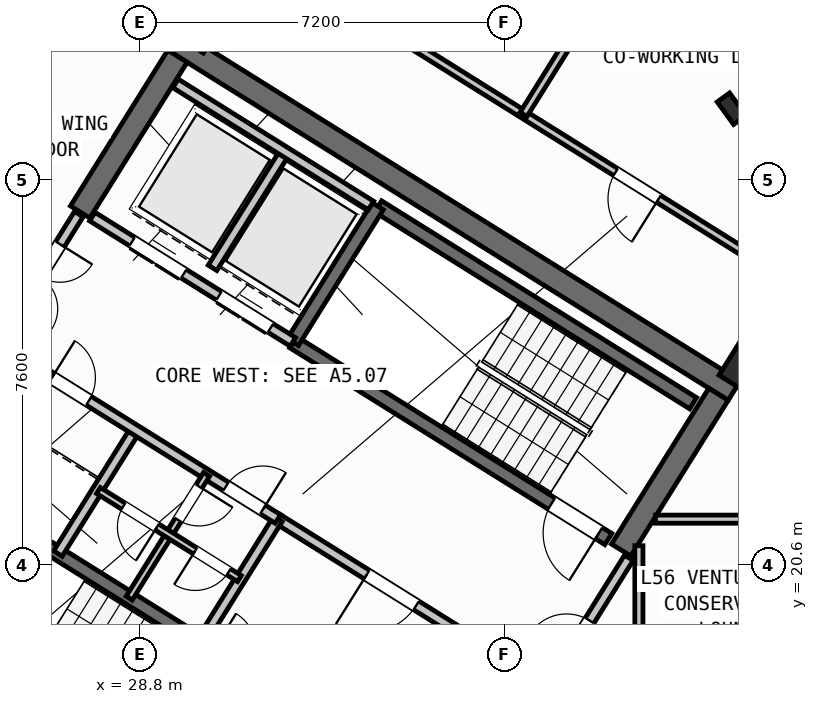
"""IFC4 building model, lengths in metres.
Left out: names, types, materials, properties, quantities, classifications, styles, units other than length and angle.
Written with IfcOpenShell. Run it as: python <this file> out.ifc"""

import sys

from ifc_helpers import new_model, si_unit, direction, frame, frame_2d, origin, origin_2d, place, context, subcontext, project, spatial, rectangle, hollow_rectangle, i_section, extrude, source, transform, mapped, element, fill, save


model = new_model("IFC4")
c1 = context("Model", 3, precision=1e-05, world=origin(), true_north=direction((0.0, 1.0)))
c2 = subcontext(c1, "Body", "Model", "MODEL_VIEW")
j1 = project(units=[si_unit("LENGTHUNIT", "METRE"), si_unit("PLANEANGLEUNIT", "RADIAN")], contexts=[c1])
p1 = place(None, origin())
s1 = spatial("IfcSite", under=j1, at=p1, CompositionType="ELEMENT")
p2 = place(p1, origin())
s2 = spatial("IfcBuilding", under=s1, at=p2, CompositionType="ELEMENT")
p3 = place(p2, frame((0.0, 0.0, 222.0)))
s3 = spatial("IfcBuildingStorey", under=s2, at=p3, CompositionType="ELEMENT", Elevation=222.0)
p4 = place(p3, frame((40.531, 24.036, 0.0), z_axis=(0.0, 0.0, 1.0), x_axis=(-0.848048787466, 0.529918157905, 0.0)))
e1 = element("IfcWall", 1, at=p4, inside=s3, PredefinedType="SHEAR", context=c2, shape_type="SweptSolid", body=[
    extrude(rectangle(XDim=13.04, YDim=0.45, at=frame_2d((6.52, 0.0))), origin(), (0.0, 0.0, 1.0), 3.35),
])
p5 = place(p3, frame((33.324, 12.503, 0.0), z_axis=(0.0, 0.0, 1.0), x_axis=(-0.848043529849, 0.529926571782, 0.0)))
e2 = element("IfcWall", 2, at=p5, inside=s3, PredefinedType="SHEAR", context=c2, shape_type="SweptSolid", body=[
    extrude(rectangle(XDim=13.04, YDim=0.45, at=frame_2d((6.52, 0.0))), origin(), (0.0, 0.0, 1.0), 3.35),
])
for number, where, z_axis, x_axis in (
    (3, (40.221, 23.965, 0.0), (0.0, 0.0, 1.0), (-0.53, -0.848, 0.0)),
    (4, (29.544, 30.636, 0.0), (0.0, 0.0, 1.0), (-0.53, -0.848, 0.0)),
):
    element("IfcWall", number, at=place(p3, frame(where, z_axis=z_axis, x_axis=x_axis)), inside=s3, PredefinedType="SHEAR", context=c2, shape_type="SweptSolid", body=[
        extrude(rectangle(XDim=3.625, YDim=0.45, at=frame_2d((1.812, 0.0))), origin(), (0.0, 0.0, 1.0), 3.35),
    ])
m1 = source(origin(), c2, "Body", "SweptSolid", [
    extrude(hollow_rectangle(XDim=0.8, YDim=0.8, WallThickness=0.032, at=origin_2d()), origin(), (0.0, 0.0, 1.0), 3.6),
])
for number, where, z_axis, x_axis in (
    (5, (40.783, 24.469, 0.0), (0.0, 0.0, 1.0), (-0.848, 0.53, 0.0)),
    (6, (29.928, 31.251, 0.0), (0.0, 0.0, 1.0), (-0.848, 0.53, 0.0)),
):
    element("IfcColumn", number, at=place(p3, frame(where, z_axis=z_axis, x_axis=x_axis)), inside=s3, PredefinedType="COLUMN", context=c2, shape_type="MappedRepresentation", body=[
        mapped(m1, transform((0.0, 0.0, 0.0), scale=1.0)),
    ])
m2 = source(origin(), c2, "Body", "SweptSolid", [
    extrude(i_section(OverallWidth=0.3, OverallDepth=0.55, WebThickness=0.015, FlangeThickness=0.029, at=origin_2d()), origin(), (0.0, 0.0, 1.0), 3.6),
])
p6 = place(p3, frame((40.479, 29.601, 0.0), z_axis=(0.0, 0.0, 1.0), x_axis=(0.809016994375, 0.587785252292, 0.0)))
e7 = element("IfcColumn", 7, at=p6, inside=s3, PredefinedType="COLUMN", context=c2, shape_type="MappedRepresentation", body=[
    mapped(m2, transform((0.0, 0.0, 0.0), scale=1.0)),
])
p7 = place(p3, frame((31.76, 12.183, 0.0), z_axis=(0.0, 0.0, 1.0), x_axis=(-0.848047074256, 0.529920899612, 0.0)))
e8 = element("IfcWall", 8, at=p7, inside=s3, PredefinedType="STANDARD", context=c2, shape_type="SweptSolid", body=[
    extrude(rectangle(XDim=30.652, YDim=0.32, at=frame_2d((15.326, 0.0))), origin(), (0.0, 0.0, 1.0), 3.35),
])
p8 = place(p7, frame((15.166, 0.0, 0.0)))
e9 = element("IfcOpeningElement", 9, at=p8, cuts=e8, PredefinedType="OPENING", context=c2, shape_type="SweptSolid", body=[
    extrude(rectangle(XDim=1.2, YDim=2.15, at=frame_2d((0.6, 1.075))), frame((0.0, 0.17, 0.0), z_axis=(0.0, -1.0, 0.0), x_axis=(1.0, 0.0, 0.0)), (0.0, 0.0, 1.0), 0.34),
])
p9 = place(p7, frame((2.24, 0.0, 0.9)))
e10 = element("IfcOpeningElement", 10, at=p9, cuts=e8, PredefinedType="OPENING", context=c2, shape_type="SweptSolid", body=[
    extrude(rectangle(XDim=1.65, YDim=1.45, at=frame_2d((0.825, 0.725))), frame((0.0, 0.17, 0.0), z_axis=(0.0, -1.0, 0.0), x_axis=(1.0, 0.0, 0.0)), (0.0, 0.0, 1.0), 0.34),
])
p10 = place(p7, frame((7.469, 0.0, 0.9)))
e11 = element("IfcOpeningElement", 11, at=p10, cuts=e8, PredefinedType="OPENING", context=c2, shape_type="SweptSolid", body=[
    extrude(rectangle(XDim=1.65, YDim=1.45, at=frame_2d((0.825, 0.725))), frame((0.0, 0.17, 0.0), z_axis=(0.0, -1.0, 0.0), x_axis=(1.0, 0.0, 0.0)), (0.0, 0.0, 1.0), 0.34),
])
p11 = place(p7, frame((12.623, 0.0, 1.0)))
e12 = element("IfcOpeningElement", 12, at=p11, cuts=e8, PredefinedType="OPENING", context=c2, shape_type="SweptSolid", body=[
    extrude(rectangle(XDim=0.9, YDim=1.25, at=frame_2d((0.45, 0.625))), frame((0.0, 0.17, 0.0), z_axis=(0.0, -1.0, 0.0), x_axis=(1.0, 0.0, 0.0)), (0.0, 0.0, 1.0), 0.34),
])
p12 = place(p7, frame((19.583, 0.0, 1.0)))
e13 = element("IfcOpeningElement", 13, at=p12, cuts=e8, PredefinedType="OPENING", context=c2, shape_type="SweptSolid", body=[
    extrude(rectangle(XDim=0.9, YDim=1.25, at=frame_2d((0.45, 0.625))), frame((0.0, 0.17, 0.0), z_axis=(0.0, -1.0, 0.0), x_axis=(1.0, 0.0, 0.0)), (0.0, 0.0, 1.0), 0.34),
])
p13 = place(p7, frame((22.033, 0.0, 1.0)))
e14 = element("IfcOpeningElement", 14, at=p13, cuts=e8, PredefinedType="OPENING", context=c2, shape_type="SweptSolid", body=[
    extrude(rectangle(XDim=0.9, YDim=1.25, at=frame_2d((0.45, 0.625))), frame((0.0, 0.17, 0.0), z_axis=(0.0, -1.0, 0.0), x_axis=(1.0, 0.0, 0.0)), (0.0, 0.0, 1.0), 0.34),
])
p14 = place(p7, frame((27.666, 0.0, 0.9)))
e15 = element("IfcOpeningElement", 15, at=p14, cuts=e8, PredefinedType="OPENING", context=c2, shape_type="SweptSolid", body=[
    extrude(rectangle(XDim=1.35, YDim=1.45, at=frame_2d((0.675, 0.725))), frame((0.0, 0.17, 0.0), z_axis=(0.0, -1.0, 0.0), x_axis=(1.0, 0.0, 0.0)), (0.0, 0.0, 1.0), 0.34),
])
p15 = place(p3, frame((29.605, 15.581, 0.0), z_axis=(0.0, 0.0, 1.0), x_axis=(-0.848036911448, 0.529937163087, 0.0)))
e16 = element("IfcWall", 16, at=p15, inside=s3, PredefinedType="SHEAR", context=c2, shape_type="SweptSolid", body=[
    extrude(rectangle(XDim=7.46, YDim=0.26, at=frame_2d((3.73, 0.0))), origin(), (0.0, 0.0, 1.0), 3.35),
])
p16 = place(p3, frame((31.28, 18.261, 0.0), z_axis=(0.0, 0.0, 1.0), x_axis=(-0.848051618787, 0.529913626805, 0.0)))
e17 = element("IfcWall", 17, at=p16, inside=s3, PredefinedType="SHEAR", context=c2, shape_type="SweptSolid", body=[
    extrude(rectangle(XDim=7.46, YDim=0.26, at=frame_2d((3.73, 0.0))), origin(), (0.0, 0.0, 1.0), 3.35),
])
p17 = place(p16, frame((0.36, 0.0, 0.0)))
e18 = element("IfcOpeningElement", 18, at=p17, cuts=e17, PredefinedType="OPENING", context=c2, shape_type="SweptSolid", body=[
    extrude(rectangle(XDim=0.86, YDim=2.05, at=frame_2d((0.43, 1.025))), frame((0.0, 0.14, 0.0), z_axis=(0.0, -1.0, 0.0), x_axis=(1.0, 0.0, 0.0)), (0.0, 0.0, 1.0), 0.28),
])
p18 = place(p3, frame((39.721, 23.788, 0.0), z_axis=(0.0, 0.0, 1.0), x_axis=(-0.848054434086, 0.529909121291, 0.0)))
e19 = element("IfcWall", 19, at=p18, inside=s3, PredefinedType="SHEAR", context=c2, shape_type="SweptSolid", body=[
    extrude(rectangle(XDim=7.33, YDim=0.26, at=frame_2d((3.665, 0.0))), origin(), (0.0, 0.0, 1.0), 3.35),
])
p19 = place(p3, frame((38.046, 21.108, 0.0), z_axis=(0.0, 0.0, 1.0), x_axis=(-0.848054434086, 0.529909121291, 0.0)))
e20 = element("IfcWall", 20, at=p19, inside=s3, PredefinedType="SHEAR", context=c2, shape_type="SweptSolid", body=[
    extrude(rectangle(XDim=7.33, YDim=0.26, at=frame_2d((3.665, 0.0))), origin(), (0.0, 0.0, 1.0), 3.35),
])
p20 = place(p19, frame((0.22, 0.0, 0.0)))
e21 = element("IfcOpeningElement", 21, at=p20, cuts=e20, PredefinedType="OPENING", context=c2, shape_type="SweptSolid", body=[
    extrude(rectangle(XDim=1.1, YDim=2.1, at=frame_2d((0.55, 1.05))), frame((0.0, 0.14, 0.0), z_axis=(0.0, -1.0, 0.0), x_axis=(1.0, 0.0, 0.0)), (0.0, 0.0, 1.0), 0.28),
])
p21 = place(p3, frame((33.496, 27.677, 0.0), z_axis=(0.0, 0.0, 1.0), x_axis=(-0.529908658664, -0.84805472316, 0.0)))
e22 = element("IfcWall", 22, at=p21, inside=s3, PredefinedType="SHEAR", context=c2, shape_type="SweptSolid", body=[
    extrude(rectangle(XDim=3.16, YDim=0.26, at=frame_2d((1.58, 0.0))), origin(), (0.0, 0.0, 1.0), 3.35),
])
p22 = place(p3, frame((36.459, 18.421, 0.0), z_axis=(0.0, 0.0, 1.0), x_axis=(-0.848059591691, 0.529900867089, 0.0)))
e23 = element("IfcWall", 23, at=p22, inside=s3, PredefinedType="STANDARD", context=c2, shape_type="SweptSolid", body=[
    extrude(rectangle(XDim=5.818, YDim=0.2, at=frame_2d((2.909, 0.0))), origin(), (0.0, 0.0, 1.0), 3.34),
])
p23 = place(p22, frame((2.598, 0.0, 0.0)))
e24 = element("IfcOpeningElement", 24, at=p23, cuts=e23, PredefinedType="OPENING", context=c2, shape_type="SweptSolid", body=[
    extrude(rectangle(XDim=1.15, YDim=2.1, at=frame_2d((0.575, 1.05))), frame((0.0, 0.11, 0.0), z_axis=(0.0, -1.0, 0.0), x_axis=(1.0, 0.0, 0.0)), (0.0, 0.0, 1.0), 0.22),
])
p24 = place(p3, frame((31.822, 24.998, 0.0), z_axis=(0.0, 0.0, 1.0), x_axis=(-0.848054125777, 0.529909614701, 0.0)))
e25 = element("IfcWall", 25, at=p24, inside=s3, PredefinedType="STANDARD", context=c2, shape_type="SweptSolid", body=[
    extrude(rectangle(XDim=4.668, YDim=0.2, at=frame_2d((2.334, 0.0))), origin(), (0.0, 0.0, 1.0), 3.34),
])
p25 = place(p24, frame((0.52, 0.0, 0.0)))
e26 = element("IfcOpeningElement", 26, at=p25, cuts=e25, PredefinedType="OPENING", context=c2, shape_type="SweptSolid", body=[
    extrude(rectangle(XDim=1.2, YDim=2.15, at=frame_2d((0.6, 1.075))), frame((0.0, 0.11, 0.0), z_axis=(0.0, -1.0, 0.0), x_axis=(1.0, 0.0, 0.0)), (0.0, 0.0, 1.0), 0.22),
])
p26 = place(p24, frame((2.54, 0.0, 0.0)))
e27 = element("IfcOpeningElement", 27, at=p26, cuts=e25, PredefinedType="OPENING", context=c2, shape_type="SweptSolid", body=[
    extrude(rectangle(XDim=1.2, YDim=2.15, at=frame_2d((0.6, 1.075))), frame((0.0, 0.11, 0.0), z_axis=(0.0, -1.0, 0.0), x_axis=(1.0, 0.0, 0.0)), (0.0, 0.0, 1.0), 0.22),
])
p27 = place(p3, frame((31.645, 28.716, 0.0), z_axis=(0.0, 0.0, 1.0), x_axis=(-0.52986693015, -0.848080795876, 0.0)))
e28 = element("IfcWall", 28, at=p27, inside=s3, PredefinedType="STANDARD", context=c2, shape_type="SweptSolid", body=[
    extrude(rectangle(XDim=2.66, YDim=0.2, at=frame_2d((1.33, 0.0))), origin(), (0.0, 0.0, 1.0), 3.34),
])
p28 = place(p3, frame((33.363, 27.69, 0.0), z_axis=(0.0, 0.0, 1.0), x_axis=(-0.84804957148, 0.529916903215, 0.0)))
e29 = element("IfcWall", 29, at=p28, inside=s3, PredefinedType="STANDARD", context=c2, shape_type="SweptSolid", body=[
    extrude(rectangle(XDim=4.548, YDim=0.2, at=frame_2d((2.274, 0.0))), origin(), (0.0, 0.0, 1.0), 3.34),
])
for number, where, z_axis, x_axis in (
    (30, (31.525, 21.504, 0.0), (0.0, 0.0, 1.0), (-0.53, -0.848, 0.0)),
    (31, (28.71, 23.263, 0.0), (0.0, 0.0, 1.0), (-0.53, -0.848, 0.0)),
):
    element("IfcWall", number, at=place(p3, frame(where, z_axis=z_axis, x_axis=x_axis)), inside=s3, PredefinedType="STANDARD", context=c2, shape_type="SweptSolid", body=[
        extrude(rectangle(XDim=2.88, YDim=0.2, at=frame_2d((1.44, 0.0))), origin(), (0.0, 0.0, 1.0), 3.34),
    ])
p29 = place(p3, frame((31.525, 21.504, 0.0), z_axis=(0.0, 0.0, 1.0), x_axis=(-0.848042066329, 0.529928913853, 0.0)))
e32 = element("IfcWall", 32, at=p29, inside=s3, PredefinedType="STANDARD", context=c2, shape_type="SweptSolid", body=[
    extrude(rectangle(XDim=6.268, YDim=0.2, at=frame_2d((3.134, 0.0))), origin(), (0.0, 0.0, 1.0), 3.34),
])
p30 = place(p29, frame((4.4, 0.0, 0.0)))
e33 = element("IfcOpeningElement", 33, at=p30, cuts=e32, PredefinedType="OPENING", context=c2, shape_type="SweptSolid", body=[
    extrude(rectangle(XDim=0.86, YDim=2.05, at=frame_2d((0.43, 1.025))), frame((0.0, 0.11, 0.0), z_axis=(0.0, -1.0, 0.0), x_axis=(1.0, 0.0, 0.0)), (0.0, 0.0, 1.0), 0.22),
])
p31 = place(p29, frame((0.35, 0.0, 0.0)))
e34 = element("IfcOpeningElement", 34, at=p31, cuts=e32, PredefinedType="OPENING", context=c2, shape_type="SweptSolid", body=[
    extrude(rectangle(XDim=0.86, YDim=2.05, at=frame_2d((0.43, 1.025))), frame((0.0, 0.11, 0.0), z_axis=(0.0, -1.0, 0.0), x_axis=(1.0, 0.0, 0.0)), (0.0, 0.0, 1.0), 0.22),
])
p32 = place(p3, frame((30.117, 22.384, 0.0), z_axis=(0.0, 0.0, 1.0), x_axis=(-0.529951914384, -0.848027693204, 0.0)))
e35 = element("IfcWall", 35, at=p32, inside=s3, PredefinedType="PLUMBINGWALL", context=c2, shape_type="SweptSolid", body=[
    extrude(rectangle(XDim=1.4, YDim=0.14, at=frame_2d((0.7, 0.0))), origin(), (0.0, 0.0, 1.0), 3.34),
])
p33 = place(p32, frame((0.28, 0.0, 0.0)))
e36 = element("IfcOpeningElement", 36, at=p33, cuts=e35, PredefinedType="OPENING", context=c2, shape_type="SweptSolid", body=[
    extrude(rectangle(XDim=0.78, YDim=2.05, at=frame_2d((0.39, 1.025))), frame((0.0, 0.08, 0.0), z_axis=(0.0, -1.0, 0.0), x_axis=(1.0, 0.0, 0.0)), (0.0, 0.0, 1.0), 0.16),
])
p34 = place(p3, frame((29.375, 21.196, 0.0), z_axis=(0.0, 0.0, 1.0), x_axis=(-0.529865479138, -0.848081702443, 0.0)))
e37 = element("IfcWall", 37, at=p34, inside=s3, PredefinedType="PLUMBINGWALL", context=c2, shape_type="SweptSolid", body=[
    extrude(rectangle(XDim=1.48, YDim=0.14, at=frame_2d((0.74, 0.0))), origin(), (0.0, 0.0, 1.0), 3.34),
])
p35 = place(p3, frame((30.766, 20.327, 0.0), z_axis=(0.0, 0.0, 1.0), x_axis=(-0.848052663127, 0.529911955482, 0.0)))
e38 = element("IfcWall", 38, at=p35, inside=s3, PredefinedType="PLUMBINGWALL", context=c2, shape_type="SweptSolid", body=[
    extrude(rectangle(XDim=3.28, YDim=0.14, at=frame_2d((1.64, 0.0))), origin(), (0.0, 0.0, 1.0), 3.34),
])
p36 = place(p35, frame((0.25, 0.0, 0.0)))
e39 = element("IfcOpeningElement", 39, at=p36, cuts=e38, PredefinedType="OPENING", context=c2, shape_type="SweptSolid", body=[
    extrude(rectangle(XDim=0.78, YDim=2.05, at=frame_2d((0.39, 1.025))), frame((0.0, 0.08, 0.0), z_axis=(0.0, -1.0, 0.0), x_axis=(1.0, 0.0, 0.0)), (0.0, 0.0, 1.0), 0.16),
])
p37 = place(p35, frame((1.92, 0.0, 0.0)))
e40 = element("IfcOpeningElement", 40, at=p37, cuts=e38, PredefinedType="OPENING", context=c2, shape_type="SweptSolid", body=[
    extrude(rectangle(XDim=0.78, YDim=2.05, at=frame_2d((0.39, 1.025))), frame((0.0, 0.08, 0.0), z_axis=(0.0, -1.0, 0.0), x_axis=(1.0, 0.0, 0.0)), (0.0, 0.0, 1.0), 0.16),
])
p38 = place(p3, frame((27.596, 27.52, 0.0), z_axis=(0.0, 0.0, 1.0), x_axis=(-0.529865479138, -0.848081702443, 0.0)))
e41 = element("IfcWall", 41, at=p38, inside=s3, PredefinedType="STANDARD", context=c2, shape_type="SweptSolid", body=[
    extrude(rectangle(XDim=2.96, YDim=0.2, at=frame_2d((1.48, 0.0))), origin(), (0.0, 0.0, 1.0), 3.34),
])
p39 = place(p38, frame((0.7, 0.0, 0.0)))
e42 = element("IfcOpeningElement", 42, at=p39, cuts=e41, PredefinedType="OPENING", context=c2, shape_type="SweptSolid", body=[
    extrude(rectangle(XDim=1.5, YDim=2.15, at=frame_2d((0.75, 1.075))), frame((0.0, 0.11, 0.0), z_axis=(0.0, -1.0, 0.0), x_axis=(1.0, 0.0, 0.0)), (0.0, 0.0, 1.0), 0.22),
])
p40 = place(p3, frame((31.239, 38.274, 0.0), z_axis=(0.0, 0.0, 1.0), x_axis=(-0.529920220799, -0.848047498427, 0.0)))
e43 = element("IfcWall", 43, at=p40, inside=s3, PredefinedType="PARTITIONING", context=c2, shape_type="SweptSolid", body=[
    extrude(rectangle(XDim=9.2, YDim=0.16, at=frame_2d((4.6, 0.0))), origin(), (0.0, 0.0, 1.0), 3.34),
])
p41 = place(p3, frame((41.936, 26.012, 0.0), z_axis=(0.0, 0.0, 1.0), x_axis=(-0.848051154596, 0.529914369676, 0.0)))
e44 = element("IfcWall", 44, at=p41, inside=s3, PredefinedType="PARTITIONING", context=c2, shape_type="SweptSolid", body=[
    extrude(rectangle(XDim=15.57, YDim=0.16, at=frame_2d((7.785, 0.0))), origin(), (0.0, 0.0, 1.0), 3.34),
])
p42 = place(p41, frame((3.415, 0.0, 0.0)))
e45 = element("IfcOpeningElement", 45, at=p42, cuts=e44, PredefinedType="OPENING", context=c2, shape_type="SweptSolid", body=[
    extrude(rectangle(XDim=1.0, YDim=2.1, at=frame_2d((0.5, 1.05))), frame((0.0, 0.09, 0.0), z_axis=(0.0, -1.0, 0.0), x_axis=(1.0, 0.0, 0.0)), (0.0, 0.0, 1.0), 0.18),
])
p43 = place(p41, frame((10.565, 0.0, 0.0)))
e46 = element("IfcOpeningElement", 46, at=p43, cuts=e44, PredefinedType="OPENING", context=c2, shape_type="SweptSolid", body=[
    extrude(rectangle(XDim=1.0, YDim=2.1, at=frame_2d((0.5, 1.05))), frame((0.0, 0.09, 0.0), z_axis=(0.0, -1.0, 0.0), x_axis=(1.0, 0.0, 0.0)), (0.0, 0.0, 1.0), 0.18),
])
p44 = place(p3, frame((38.943, 33.601, 0.0), z_axis=(0.0, 0.0, 1.0), x_axis=(-0.529949167559, -0.848029409752, 0.0)))
e47 = element("IfcWall", 47, at=p44, inside=s3, PredefinedType="PARTITIONING", context=c2, shape_type="SweptSolid", body=[
    extrude(rectangle(XDim=4.85, YDim=0.16, at=frame_2d((2.425, 0.0))), origin(), (0.0, 0.0, 1.0), 3.34),
])
p45 = place(p3, frame((38.451, 20.737, 0.0), z_axis=(0.0, 0.0, 1.0), x_axis=(-0.529924799939, -0.848044637038, 0.0)))
e48 = element("IfcWall", 48, at=p45, inside=s3, PredefinedType="STANDARD", context=c2, shape_type="SweptSolid", body=[
    extrude(rectangle(XDim=2.96, YDim=0.2, at=frame_2d((1.48, 0.0))), origin(), (0.0, 0.0, 1.0), 3.34),
])
p46 = place(p45, frame((1.46, 0.0, 0.0)))
e49 = element("IfcOpeningElement", 49, at=p46, cuts=e48, PredefinedType="OPENING", context=c2, shape_type="SweptSolid", body=[
    extrude(rectangle(XDim=0.86, YDim=2.05, at=frame_2d((0.43, 1.025))), frame((0.0, 0.11, 0.0), z_axis=(0.0, -1.0, 0.0), x_axis=(1.0, 0.0, 0.0)), (0.0, 0.0, 1.0), 0.22),
])
p47 = place(p3, frame((38.65, 17.93, 0.0), z_axis=(0.0, 0.0, 1.0), x_axis=(0.0, 1.0, 0.0)))
e50 = element("IfcWall", 50, at=p47, inside=s3, PredefinedType="PARTITIONING", context=c2, shape_type="SweptSolid", body=[
    extrude(rectangle(XDim=3.046, YDim=0.16, at=frame_2d((1.523, 0.0))), origin(), (0.0, 0.0, 1.0), 3.34),
])
p48 = place(p3, frame((38.978, 21.5, 0.0), z_axis=(0.0, 0.0, 1.0), x_axis=(1.0, 0.0, 0.0)))
e51 = element("IfcWall", 51, at=p48, inside=s3, PredefinedType="PARTITIONING", context=c2, shape_type="SweptSolid", body=[
    extrude(rectangle(XDim=7.336, YDim=0.16, at=frame_2d((3.668, 0.0))), origin(), (0.0, 0.0, 1.0), 3.34),
])
m3 = source(origin(), c2, "Body", "SweptSolid", [
    extrude(rectangle(XDim=1.1, YDim=2.1, at=frame_2d((0.55, 1.05))), frame((0.0, 0.025, 0.0), z_axis=(0.0, -1.0, 0.0), x_axis=(1.0, 0.0, 0.0)), (0.0, 0.0, 1.0), 0.05),
])
p49 = place(p20, origin())
e52 = element("IfcDoor", 52, at=p49, inside=s3, OperationType="SINGLE_SWING_LEFT", PredefinedType="DOOR", context=c2, shape_type="MappedRepresentation", body=[
    mapped(m3, transform((0.0, 0.0, 0.0), scale=1.0)),
])
fill(e21, e52)
m4 = source(origin(), c2, "Body", "SweptSolid", [
    extrude(rectangle(XDim=1.15, YDim=2.1, at=frame_2d((0.575, 1.05))), frame((0.0, 0.025, 0.0), z_axis=(0.0, -1.0, 0.0), x_axis=(1.0, 0.0, 0.0)), (0.0, 0.0, 1.0), 0.05),
])
p50 = place(p23, origin())
e53 = element("IfcDoor", 53, at=p50, inside=s3, OperationType="SINGLE_SWING_RIGHT", PredefinedType="DOOR", context=c2, shape_type="MappedRepresentation", body=[
    mapped(m4, transform((0.0, 0.0, 0.0), scale=1.0)),
])
fill(e24, e53)
m5 = source(origin(), c2, "Body", "SweptSolid", [
    extrude(rectangle(XDim=1.2, YDim=2.15, at=frame_2d((0.6, 1.075))), frame((0.0, 0.025, 0.0), z_axis=(0.0, -1.0, 0.0), x_axis=(1.0, 0.0, 0.0)), (0.0, 0.0, 1.0), 0.05),
])
p51 = place(p25, origin())
e54 = element("IfcDoor", 54, at=p51, inside=s3, OperationType="DOUBLE_DOOR_SLIDING", PredefinedType="DOOR", context=c2, shape_type="MappedRepresentation", body=[
    mapped(m5, transform((0.0, 0.0, 0.0), scale=1.0)),
])
fill(e26, e54)
p52 = place(p26, origin())
e55 = element("IfcDoor", 55, at=p52, inside=s3, OperationType="DOUBLE_DOOR_SLIDING", PredefinedType="DOOR", context=c2, shape_type="MappedRepresentation", body=[
    mapped(m5, transform((0.0, 0.0, 0.0), scale=1.0)),
])
fill(e27, e55)
m6 = source(origin(), c2, "Body", "SweptSolid", [
    extrude(rectangle(XDim=0.86, YDim=2.05, at=frame_2d((0.43, 1.025))), frame((0.0, 0.025, 0.0), z_axis=(0.0, -1.0, 0.0), x_axis=(1.0, 0.0, 0.0)), (0.0, 0.0, 1.0), 0.05),
])
p53 = place(p30, frame((0.86, 0.0, 0.0), z_axis=(0.0, 0.0, 1.0), x_axis=(-1.0, 0.0, 0.0)))
e56 = element("IfcDoor", 56, at=p53, inside=s3, OperationType="SINGLE_SWING_LEFT", PredefinedType="DOOR", context=c2, shape_type="MappedRepresentation", body=[
    mapped(m6, transform((0.0, 0.0, 0.0), scale=1.0)),
])
fill(e33, e56)
p54 = place(p31, frame((0.86, 0.0, 0.0), z_axis=(0.0, 0.0, 1.0), x_axis=(-1.0, 0.0, 0.0)))
e57 = element("IfcDoor", 57, at=p54, inside=s3, OperationType="SINGLE_SWING_RIGHT", PredefinedType="DOOR", context=c2, shape_type="MappedRepresentation", body=[
    mapped(m6, transform((0.0, 0.0, 0.0), scale=1.0)),
])
fill(e34, e57)
m7 = source(origin(), c2, "Body", "SweptSolid", [
    extrude(rectangle(XDim=0.78, YDim=2.05, at=frame_2d((0.39, 1.025))), frame((0.0, 0.025, 0.0), z_axis=(0.0, -1.0, 0.0), x_axis=(1.0, 0.0, 0.0)), (0.0, 0.0, 1.0), 0.05),
])
p55 = place(p33, origin())
e58 = element("IfcDoor", 58, at=p55, inside=s3, OperationType="SINGLE_SWING_LEFT", PredefinedType="DOOR", context=c2, shape_type="MappedRepresentation", body=[
    mapped(m7, transform((0.0, 0.0, 0.0), scale=1.0)),
])
fill(e36, e58)
p56 = place(p36, origin())
e59 = element("IfcDoor", 59, at=p56, inside=s3, OperationType="SINGLE_SWING_RIGHT", PredefinedType="DOOR", context=c2, shape_type="MappedRepresentation", body=[
    mapped(m7, transform((0.0, 0.0, 0.0), scale=1.0)),
])
fill(e39, e59)
p57 = place(p37, origin())
e60 = element("IfcDoor", 60, at=p57, inside=s3, OperationType="SINGLE_SWING_LEFT", PredefinedType="DOOR", context=c2, shape_type="MappedRepresentation", body=[
    mapped(m7, transform((0.0, 0.0, 0.0), scale=1.0)),
])
fill(e40, e60)
m8 = source(origin(), c2, "Body", "SweptSolid", [
    extrude(rectangle(XDim=1.5, YDim=2.15, at=frame_2d((0.75, 1.075))), frame((0.0, 0.025, 0.0), z_axis=(0.0, -1.0, 0.0), x_axis=(1.0, 0.0, 0.0)), (0.0, 0.0, 1.0), 0.05),
])
p58 = place(p39, origin())
e61 = element("IfcDoor", 61, at=p58, inside=s3, OperationType="DOUBLE_DOOR_SINGLE_SWING", PredefinedType="DOOR", context=c2, shape_type="MappedRepresentation", body=[
    mapped(m8, transform((0.0, 0.0, 0.0), scale=1.0)),
])
fill(e42, e61)
m9 = source(origin(), c2, "Body", "SweptSolid", [
    extrude(rectangle(XDim=1.0, YDim=2.1, at=frame_2d((0.5, 1.05))), frame((0.0, 0.025, 0.0), z_axis=(0.0, -1.0, 0.0), x_axis=(1.0, 0.0, 0.0)), (0.0, 0.0, 1.0), 0.05),
])
p59 = place(p42, origin())
e62 = element("IfcDoor", 62, at=p59, inside=s3, OperationType="SINGLE_SWING_LEFT", PredefinedType="DOOR", context=c2, shape_type="MappedRepresentation", body=[
    mapped(m9, transform((0.0, 0.0, 0.0), scale=1.0)),
])
fill(e45, e62)
p60 = place(p46, frame((0.86, 0.0, 0.0), z_axis=(0.0, 0.0, 1.0), x_axis=(-1.0, 0.0, 0.0)))
e63 = element("IfcDoor", 63, at=p60, inside=s3, OperationType="SINGLE_SWING_LEFT", PredefinedType="DOOR", context=c2, shape_type="MappedRepresentation", body=[
    mapped(m6, transform((0.0, 0.0, 0.0), scale=1.0)),
])
fill(e49, e63)
save(model, sys.argv[1])
